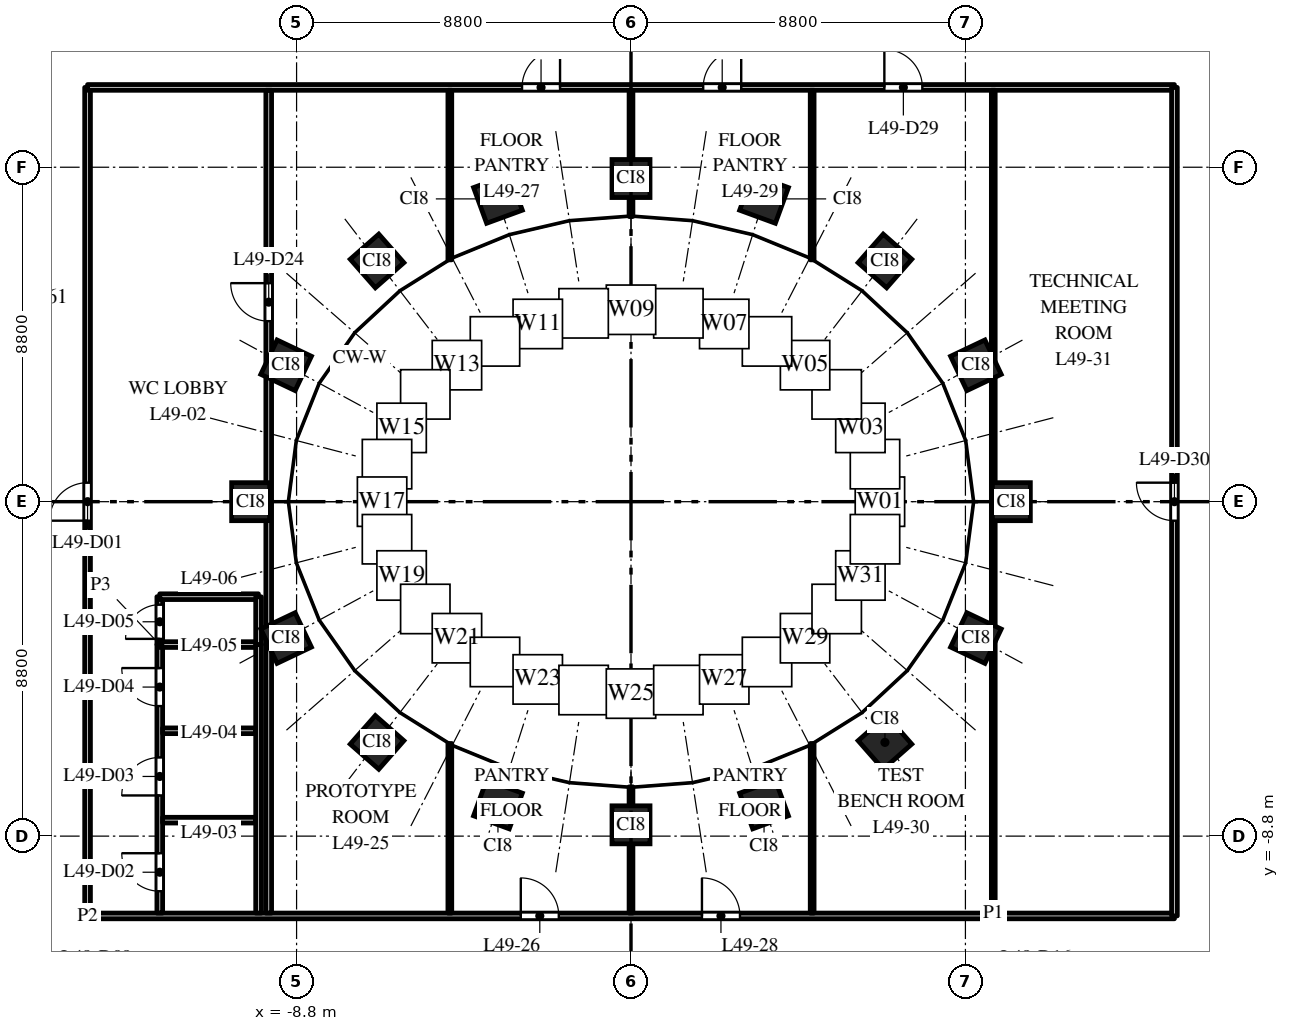
"""IFC4 building model, lengths in metres.
Left out: names, types, materials, properties, quantities, classifications, styles, units other than length and angle.
Written with IfcOpenShell. Run it as: python <this file> out.ifc"""

import sys

from ifc_helpers import new_model, si_unit, direction, frame, frame_2d, origin, origin_2d, place, context, subcontext, project, spatial, rectangle, extrude, element, fill, save


model = new_model("IFC4")
c1 = context("Model", 3, precision=1e-05, world=origin(), true_north=direction((0.0, 1.0)))
c2 = subcontext(c1, "Body", "Model", "MODEL_VIEW")
j1 = project(units=[si_unit("LENGTHUNIT", "METRE"), si_unit("PLANEANGLEUNIT", "RADIAN")], contexts=[c1])
p1 = place(None, origin())
s1 = spatial("IfcSite", under=j1, at=p1, CompositionType="ELEMENT")
p2 = place(p1, origin())
s2 = spatial("IfcBuilding", under=s1, at=p2, CompositionType="ELEMENT")
p3 = place(p2, frame((0.0, 0.0, 237.5)))
s3 = spatial("IfcBuildingStorey", under=s2, at=p3, CompositionType="ELEMENT", Elevation=237.5)
for number, where, z_axis, x_axis in (
    (1, (10.008, 0.0, 0.0), (0.0, 0.0, 1.0), (0.0, 1.0, 0.0)),
    (2, (9.076, 3.588, 0.0), (0.0, 0.0, 1.0), (-0.429, 0.903, 0.0)),
    (3, (6.682, 6.334, 0.0), (0.0, 0.0, 1.0), (-0.751, 0.66, 0.0)),
    (4, (3.501, 7.967, 0.0), (0.0, 0.0, 1.0), (-0.939, 0.344, 0.0)),
    (5, (0.0, 8.503, 0.0), (0.0, 0.0, 1.0), (-1.0, 0.0, 0.0)),
    (6, (-3.501, 7.967, 0.0), (0.0, 0.0, 1.0), (-0.939, -0.344, 0.0)),
    (7, (-6.682, 6.334, 0.0), (0.0, 0.0, 1.0), (-0.751, -0.66, 0.0)),
    (8, (-9.076, 3.588, 0.0), (0.0, 0.0, 1.0), (-0.429, -0.903, 0.0)),
    (9, (-10.008, 0.0, 0.0), (0.0, 0.0, 1.0), (0.0, -1.0, 0.0)),
    (10, (-9.076, -3.588, 0.0), (0.0, 0.0, 1.0), (0.429, -0.903, 0.0)),
    (11, (-6.682, -6.334, 0.0), (0.0, 0.0, 1.0), (0.751, -0.66, 0.0)),
    (12, (-3.501, -7.967, 0.0), (0.0, 0.0, 1.0), (0.939, -0.344, 0.0)),
    (13, (0.0, -8.503, 0.0), (0.0, 0.0, 1.0), (1.0, 0.0, 0.0)),
    (14, (3.501, -7.967, 0.0), (0.0, 0.0, 1.0), (0.939, 0.344, 0.0)),
    (15, (6.682, -6.334, 0.0), (0.0, 0.0, 1.0), (0.751, 0.66, 0.0)),
    (16, (9.076, -3.588, 0.0), (0.0, 0.0, 1.0), (0.429, 0.903, 0.0)),
):
    element("IfcColumn", number, at=place(p3, frame(where, z_axis=z_axis, x_axis=x_axis)), inside=s3, PredefinedType="COLUMN", context=c2, shape_type="SweptSolid", body=[
        extrude(rectangle(XDim=1.0, YDim=1.0, at=origin_2d()), origin(), (0.0, 0.0, 1.0), 4.0),
    ])
p4 = place(p3, frame((-14.3, -10.9, 0.0), z_axis=(0.0, 0.0, 1.0), x_axis=(0.0, 1.0, 0.0)))
e17 = element("IfcWall", 17, at=p4, inside=s3, PredefinedType="PARTITIONING", context=c2, shape_type="SweptSolid", body=[
    extrude(rectangle(XDim=21.8, YDim=0.15, at=frame_2d((10.9, 0.0))), origin(), (0.0, 0.0, 1.0), 2.75),
])
p5 = place(p4, frame((10.4, 0.0, 0.0)))
e18 = element("IfcOpeningElement", 18, at=p5, cuts=e17, PredefinedType="OPENING", context=c2, shape_type="SweptSolid", body=[
    extrude(rectangle(XDim=1.0, YDim=2.1, at=frame_2d((0.5, 1.05))), frame((0.0, 0.085, 0.0), z_axis=(0.0, -1.0, 0.0), x_axis=(1.0, 0.0, 0.0)), (0.0, 0.0, 1.0), 0.17),
])
p6 = place(p3, frame((-14.3, -10.9, 0.0), z_axis=(0.0, 0.0, 1.0), x_axis=(1.0, 0.0, 0.0)))
e19 = element("IfcWall", 19, at=p6, inside=s3, PredefinedType="PARTITIONING", context=c2, shape_type="SweptSolid", body=[
    extrude(rectangle(XDim=28.6, YDim=0.15, at=frame_2d((14.3, 0.0))), origin(), (0.0, 0.0, 1.0), 2.85),
])
p7 = place(p6, frame((11.4, 0.0, 0.0)))
e20 = element("IfcOpeningElement", 20, at=p7, cuts=e19, PredefinedType="OPENING", context=c2, shape_type="SweptSolid", body=[
    extrude(rectangle(XDim=1.0, YDim=2.1, at=frame_2d((0.5, 1.05))), frame((0.0, 0.085, 0.0), z_axis=(0.0, -1.0, 0.0), x_axis=(1.0, 0.0, 0.0)), (0.0, 0.0, 1.0), 0.17),
])
p8 = place(p6, frame((16.167, 0.0, 0.0)))
e21 = element("IfcOpeningElement", 21, at=p8, cuts=e19, PredefinedType="OPENING", context=c2, shape_type="SweptSolid", body=[
    extrude(rectangle(XDim=1.0, YDim=2.1, at=frame_2d((0.5, 1.05))), frame((0.0, 0.085, 0.0), z_axis=(0.0, -1.0, 0.0), x_axis=(1.0, 0.0, 0.0)), (0.0, 0.0, 1.0), 0.17),
])
p9 = place(p3, frame((-14.3, 10.9, 0.0), z_axis=(0.0, 0.0, 1.0), x_axis=(1.0, 0.0, 0.0)))
e22 = element("IfcWall", 22, at=p9, inside=s3, PredefinedType="PARTITIONING", context=c2, shape_type="SweptSolid", body=[
    extrude(rectangle(XDim=28.6, YDim=0.15, at=frame_2d((14.3, 0.0))), origin(), (0.0, 0.0, 1.0), 2.85),
])
p10 = place(p9, frame((11.433, 0.0, 0.0)))
e23 = element("IfcOpeningElement", 23, at=p10, cuts=e22, PredefinedType="OPENING", context=c2, shape_type="SweptSolid", body=[
    extrude(rectangle(XDim=1.0, YDim=2.1, at=frame_2d((0.5, 1.05))), frame((0.0, 0.085, 0.0), z_axis=(0.0, -1.0, 0.0), x_axis=(1.0, 0.0, 0.0)), (0.0, 0.0, 1.0), 0.17),
])
p11 = place(p9, frame((16.2, 0.0, 0.0)))
e24 = element("IfcOpeningElement", 24, at=p11, cuts=e22, PredefinedType="OPENING", context=c2, shape_type="SweptSolid", body=[
    extrude(rectangle(XDim=1.0, YDim=2.1, at=frame_2d((0.5, 1.05))), frame((0.0, 0.085, 0.0), z_axis=(0.0, -1.0, 0.0), x_axis=(1.0, 0.0, 0.0)), (0.0, 0.0, 1.0), 0.17),
])
p12 = place(p9, frame((20.967, 0.0, 0.0)))
e25 = element("IfcOpeningElement", 25, at=p12, cuts=e22, PredefinedType="OPENING", context=c2, shape_type="SweptSolid", body=[
    extrude(rectangle(XDim=1.0, YDim=2.1, at=frame_2d((0.5, 1.05))), frame((0.0, 0.085, 0.0), z_axis=(0.0, -1.0, 0.0), x_axis=(1.0, 0.0, 0.0)), (0.0, 0.0, 1.0), 0.17),
])
p13 = place(p3, frame((-12.4, -10.825, 0.0), z_axis=(0.0, 0.0, 1.0), x_axis=(0.0, 1.0, 0.0)))
e26 = element("IfcWall", 26, at=p13, inside=s3, PredefinedType="PARTITIONING", context=c2, shape_type="SweptSolid", body=[
    extrude(rectangle(XDim=7.065, YDim=0.15, at=frame_2d((3.532, 0.0))), origin(), (0.0, 0.0, 1.0), 2.75),
])
p14 = place(p13, frame((0.575, 0.0, 0.0)))
e27 = element("IfcOpeningElement", 27, at=p14, cuts=e26, PredefinedType="OPENING", context=c2, shape_type="SweptSolid", body=[
    extrude(rectangle(XDim=1.0, YDim=2.1, at=frame_2d((0.5, 1.05))), frame((0.0, 0.085, 0.0), z_axis=(0.0, -1.0, 0.0), x_axis=(1.0, 0.0, 0.0)), (0.0, 0.0, 1.0), 0.17),
])
p15 = place(p13, frame((3.095, 0.0, 0.0)))
e28 = element("IfcOpeningElement", 28, at=p15, cuts=e26, PredefinedType="OPENING", context=c2, shape_type="SweptSolid", body=[
    extrude(rectangle(XDim=1.0, YDim=2.1, at=frame_2d((0.5, 1.05))), frame((0.0, 0.085, 0.0), z_axis=(0.0, -1.0, 0.0), x_axis=(1.0, 0.0, 0.0)), (0.0, 0.0, 1.0), 0.17),
])
p16 = place(p13, frame((5.447, 0.0, 0.0)))
e29 = element("IfcOpeningElement", 29, at=p16, cuts=e26, PredefinedType="OPENING", context=c2, shape_type="SweptSolid", body=[
    extrude(rectangle(XDim=1.0, YDim=2.1, at=frame_2d((0.5, 1.05))), frame((0.0, 0.085, 0.0), z_axis=(0.0, -1.0, 0.0), x_axis=(1.0, 0.0, 0.0)), (0.0, 0.0, 1.0), 0.17),
])
p17 = place(p3, frame((-12.325, -8.38, 0.0), z_axis=(0.0, 0.0, 1.0), x_axis=(1.0, 0.0, 0.0)))
e30 = element("IfcWall", 30, at=p17, inside=s3, PredefinedType="PARTITIONING", context=c2, shape_type="SweptSolid", body=[
    extrude(rectangle(XDim=2.45, YDim=0.15, at=frame_2d((1.225, 0.0))), origin(), (0.0, 0.0, 1.0), 2.75),
])
p18 = place(p3, frame((-12.325, -6.028, 0.0), z_axis=(0.0, 0.0, 1.0), x_axis=(1.0, 0.0, 0.0)))
e31 = element("IfcWall", 31, at=p18, inside=s3, PredefinedType="PARTITIONING", context=c2, shape_type="SweptSolid", body=[
    extrude(rectangle(XDim=2.45, YDim=0.15, at=frame_2d((1.225, 0.0))), origin(), (0.0, 0.0, 1.0), 3.7),
])
p19 = place(p3, frame((-12.4, -3.76, 0.0), z_axis=(0.0, 0.0, 1.0), x_axis=(0.0, 1.0, 0.0)))
e32 = element("IfcWall", 32, at=p19, inside=s3, PredefinedType="PARTITIONING", context=c2, shape_type="SweptSolid", body=[
    extrude(rectangle(XDim=1.26, YDim=0.15, at=frame_2d((0.63, 0.0))), origin(), (0.0, 0.0, 1.0), 3.7),
])
p20 = place(p19, frame((0.15, 0.0, 0.0)))
e33 = element("IfcOpeningElement", 33, at=p20, cuts=e32, PredefinedType="OPENING", context=c2, shape_type="SweptSolid", body=[
    extrude(rectangle(XDim=0.9, YDim=2.1, at=frame_2d((0.45, 1.05))), frame((0.0, 0.085, 0.0), z_axis=(0.0, -1.0, 0.0), x_axis=(1.0, 0.0, 0.0)), (0.0, 0.0, 1.0), 0.17),
])
p21 = place(p3, frame((-12.4, -3.76, 0.0), z_axis=(0.0, 0.0, 1.0), x_axis=(1.0, 0.0, 0.0)))
e34 = element("IfcWall", 34, at=p21, inside=s3, PredefinedType="PARTITIONING", context=c2, shape_type="SweptSolid", body=[
    extrude(rectangle(XDim=2.6, YDim=0.15, at=frame_2d((1.3, 0.0))), origin(), (0.0, 0.0, 1.0), 3.7),
])
p22 = place(p3, frame((-12.4, -2.5, 0.0), z_axis=(0.0, 0.0, 1.0), x_axis=(1.0, 0.0, 0.0)))
e35 = element("IfcWall", 35, at=p22, inside=s3, PredefinedType="PARTITIONING", context=c2, shape_type="SweptSolid", body=[
    extrude(rectangle(XDim=2.596, YDim=0.15, at=frame_2d((1.298, 0.0))), origin(), (0.0, 0.0, 1.0), 3.7),
])
p23 = place(p3, frame((-9.8, -10.825, 0.0), z_axis=(0.0, 0.0, 1.0), x_axis=(0.0, 1.0, 0.0)))
e36 = element("IfcWall", 36, at=p23, inside=s3, PredefinedType="PARTITIONING", context=c2, shape_type="SweptSolid", body=[
    extrude(rectangle(XDim=7.065, YDim=0.15, at=frame_2d((3.532, 0.0))), origin(), (0.0, 0.0, 1.0), 2.75),
])
p24 = place(p3, frame((-9.8, -3.76, 0.0), z_axis=(0.0, 0.0, 1.0), x_axis=(0.0, 1.0, 0.0)))
e37 = element("IfcWall", 37, at=p24, inside=s3, PredefinedType="PARTITIONING", context=c2, shape_type="SweptSolid", body=[
    extrude(rectangle(XDim=1.256, YDim=0.15, at=frame_2d((0.628, 0.0))), origin(), (0.0, 0.0, 1.0), 3.7),
])
p25 = place(p3, frame((-9.533, -10.825, 0.0), z_axis=(0.0, 0.0, 1.0), x_axis=(0.0, 1.0, 0.0)))
e38 = element("IfcWall", 38, at=p25, inside=s3, PredefinedType="PARTITIONING", context=c2, shape_type="SweptSolid", body=[
    extrude(rectangle(XDim=21.65, YDim=0.15, at=frame_2d((10.825, 0.0))), origin(), (0.0, 0.0, 1.0), 2.75),
])
p26 = place(p25, frame((15.575, 0.0, 0.0)))
e39 = element("IfcOpeningElement", 39, at=p26, cuts=e38, PredefinedType="OPENING", context=c2, shape_type="SweptSolid", body=[
    extrude(rectangle(XDim=1.0, YDim=2.1, at=frame_2d((0.5, 1.05))), frame((0.0, 0.085, 0.0), z_axis=(0.0, -1.0, 0.0), x_axis=(1.0, 0.0, 0.0)), (0.0, 0.0, 1.0), 0.17),
])
for number, where, z_axis, x_axis in (
    (40, (-4.767, -10.825, 0.0), (0.0, 0.0, 1.0), (0.0, 1.0, 0.0)),
    (41, (-4.767, 6.363, 0.0), (0.0, 0.0, 1.0), (0.0, 1.0, 0.0)),
):
    element("IfcWall", number, at=place(p3, frame(where, z_axis=z_axis, x_axis=x_axis)), inside=s3, PredefinedType="PARTITIONING", context=c2, shape_type="SweptSolid", body=[
        extrude(rectangle(XDim=4.462, YDim=0.1, at=frame_2d((2.231, 0.0))), origin(), (0.0, 0.0, 1.0), 3.0),
    ])
for number, where, z_axis, x_axis in (
    (42, (0.0, -10.825, 0.0), (0.0, 0.0, 1.0), (0.0, 1.0, 0.0)),
    (43, (0.0, 7.504, 0.0), (0.0, 0.0, 1.0), (0.0, 1.0, 0.0)),
):
    element("IfcWall", number, at=place(p3, frame(where, z_axis=z_axis, x_axis=x_axis)), inside=s3, PredefinedType="PARTITIONING", context=c2, shape_type="SweptSolid", body=[
        extrude(rectangle(XDim=3.321, YDim=0.1, at=frame_2d((1.661, 0.0))), origin(), (0.0, 0.0, 1.0), 3.7),
    ])
for number, where, z_axis, x_axis in (
    (44, (4.767, -10.825, 0.0), (0.0, 0.0, 1.0), (0.0, 1.0, 0.0)),
    (45, (4.767, 6.363, 0.0), (0.0, 0.0, 1.0), (0.0, 1.0, 0.0)),
):
    element("IfcWall", number, at=place(p3, frame(where, z_axis=z_axis, x_axis=x_axis)), inside=s3, PredefinedType="PARTITIONING", context=c2, shape_type="SweptSolid", body=[
        extrude(rectangle(XDim=4.462, YDim=0.1, at=frame_2d((2.231, 0.0))), origin(), (0.0, 0.0, 1.0), 2.85),
    ])
p27 = place(p3, frame((9.533, -10.825, 0.0), z_axis=(0.0, 0.0, 1.0), x_axis=(0.0, 1.0, 0.0)))
e46 = element("IfcWall", 46, at=p27, inside=s3, PredefinedType="PARTITIONING", context=c2, shape_type="SweptSolid", body=[
    extrude(rectangle(XDim=21.65, YDim=0.1, at=frame_2d((10.825, 0.0))), origin(), (0.0, 0.0, 1.0), 2.75),
])
p28 = place(p3, frame((14.3, -10.9, 0.0), z_axis=(0.0, 0.0, 1.0), x_axis=(0.0, 1.0, 0.0)))
e47 = element("IfcWall", 47, at=p28, inside=s3, PredefinedType="PARTITIONING", context=c2, shape_type="SweptSolid", body=[
    extrude(rectangle(XDim=21.8, YDim=0.15, at=frame_2d((10.9, 0.0))), origin(), (0.0, 0.0, 1.0), 2.75),
])
p29 = place(p28, frame((10.4, 0.0, 0.0)))
e48 = element("IfcOpeningElement", 48, at=p29, cuts=e47, PredefinedType="OPENING", context=c2, shape_type="SweptSolid", body=[
    extrude(rectangle(XDim=1.0, YDim=2.1, at=frame_2d((0.5, 1.05))), frame((0.0, 0.085, 0.0), z_axis=(0.0, -1.0, 0.0), x_axis=(1.0, 0.0, 0.0)), (0.0, 0.0, 1.0), 0.17),
])
p30 = place(p5, origin())
e49 = element("IfcDoor", 49, at=p30, inside=s3, OperationType="SINGLE_SWING_LEFT", PredefinedType="DOOR", context=c2, shape_type="SweptSolid", body=[
    extrude(rectangle(XDim=1.0, YDim=2.1, at=frame_2d((0.5, 1.05))), frame((0.0, 0.025, 0.0), z_axis=(0.0, -1.0, 0.0), x_axis=(1.0, 0.0, 0.0)), (0.0, 0.0, 1.0), 0.05),
])
fill(e18, e49)
p31 = place(p14, origin())
e50 = element("IfcDoor", 50, at=p31, inside=s3, OperationType="SINGLE_SWING_RIGHT", PredefinedType="DOOR", context=c2, shape_type="SweptSolid", body=[
    extrude(rectangle(XDim=1.0, YDim=2.1, at=frame_2d((0.5, 1.05))), frame((0.0, 0.025, 0.0), z_axis=(0.0, -1.0, 0.0), x_axis=(1.0, 0.0, 0.0)), (0.0, 0.0, 1.0), 0.05),
])
fill(e27, e50)
p32 = place(p15, origin())
e51 = element("IfcDoor", 51, at=p32, inside=s3, OperationType="SINGLE_SWING_LEFT", PredefinedType="DOOR", context=c2, shape_type="SweptSolid", body=[
    extrude(rectangle(XDim=1.0, YDim=2.1, at=frame_2d((0.5, 1.05))), frame((0.0, 0.025, 0.0), z_axis=(0.0, -1.0, 0.0), x_axis=(1.0, 0.0, 0.0)), (0.0, 0.0, 1.0), 0.05),
])
fill(e28, e51)
p33 = place(p16, origin())
e52 = element("IfcDoor", 52, at=p33, inside=s3, OperationType="SINGLE_SWING_RIGHT", PredefinedType="DOOR", context=c2, shape_type="SweptSolid", body=[
    extrude(rectangle(XDim=1.0, YDim=2.1, at=frame_2d((0.5, 1.05))), frame((0.0, 0.025, 0.0), z_axis=(0.0, -1.0, 0.0), x_axis=(1.0, 0.0, 0.0)), (0.0, 0.0, 1.0), 0.05),
])
fill(e29, e52)
p34 = place(p20, origin())
e53 = element("IfcDoor", 53, at=p34, inside=s3, OperationType="SINGLE_SWING_LEFT", PredefinedType="DOOR", context=c2, shape_type="SweptSolid", body=[
    extrude(rectangle(XDim=0.9, YDim=2.1, at=frame_2d((0.45, 1.05))), frame((0.0, 0.025, 0.0), z_axis=(0.0, -1.0, 0.0), x_axis=(1.0, 0.0, 0.0)), (0.0, 0.0, 1.0), 0.05),
])
fill(e33, e53)
p35 = place(p26, origin())
e54 = element("IfcDoor", 54, at=p35, inside=s3, OperationType="SINGLE_SWING_RIGHT", PredefinedType="DOOR", context=c2, shape_type="SweptSolid", body=[
    extrude(rectangle(XDim=1.0, YDim=2.1, at=frame_2d((0.5, 1.05))), frame((0.0, 0.025, 0.0), z_axis=(0.0, -1.0, 0.0), x_axis=(1.0, 0.0, 0.0)), (0.0, 0.0, 1.0), 0.05),
])
fill(e39, e54)
p36 = place(p7, origin())
e55 = element("IfcDoor", 55, at=p36, inside=s3, OperationType="SINGLE_SWING_LEFT", PredefinedType="DOOR", context=c2, shape_type="SweptSolid", body=[
    extrude(rectangle(XDim=1.0, YDim=2.1, at=frame_2d((0.5, 1.05))), frame((0.0, 0.025, 0.0), z_axis=(0.0, -1.0, 0.0), x_axis=(1.0, 0.0, 0.0)), (0.0, 0.0, 1.0), 0.05),
])
fill(e20, e55)
p37 = place(p10, origin())
e56 = element("IfcDoor", 56, at=p37, inside=s3, OperationType="SINGLE_SWING_RIGHT", PredefinedType="DOOR", context=c2, shape_type="SweptSolid", body=[
    extrude(rectangle(XDim=1.0, YDim=2.1, at=frame_2d((0.5, 1.05))), frame((0.0, 0.025, 0.0), z_axis=(0.0, -1.0, 0.0), x_axis=(1.0, 0.0, 0.0)), (0.0, 0.0, 1.0), 0.05),
])
fill(e23, e56)
p38 = place(p8, origin())
e57 = element("IfcDoor", 57, at=p38, inside=s3, OperationType="SINGLE_SWING_LEFT", PredefinedType="DOOR", context=c2, shape_type="SweptSolid", body=[
    extrude(rectangle(XDim=1.0, YDim=2.1, at=frame_2d((0.5, 1.05))), frame((0.0, 0.025, 0.0), z_axis=(0.0, -1.0, 0.0), x_axis=(1.0, 0.0, 0.0)), (0.0, 0.0, 1.0), 0.05),
])
fill(e21, e57)
p39 = place(p11, origin())
e58 = element("IfcDoor", 58, at=p39, inside=s3, OperationType="SINGLE_SWING_RIGHT", PredefinedType="DOOR", context=c2, shape_type="SweptSolid", body=[
    extrude(rectangle(XDim=1.0, YDim=2.1, at=frame_2d((0.5, 1.05))), frame((0.0, 0.025, 0.0), z_axis=(0.0, -1.0, 0.0), x_axis=(1.0, 0.0, 0.0)), (0.0, 0.0, 1.0), 0.05),
])
fill(e24, e58)
p40 = place(p12, origin())
e59 = element("IfcDoor", 59, at=p40, inside=s3, OperationType="SINGLE_SWING_LEFT", PredefinedType="DOOR", context=c2, shape_type="SweptSolid", body=[
    extrude(rectangle(XDim=1.0, YDim=2.1, at=frame_2d((0.5, 1.05))), frame((0.0, 0.025, 0.0), z_axis=(0.0, -1.0, 0.0), x_axis=(1.0, 0.0, 0.0)), (0.0, 0.0, 1.0), 0.05),
])
fill(e25, e59)
p41 = place(p29, origin())
e60 = element("IfcDoor", 60, at=p41, inside=s3, OperationType="SINGLE_SWING_RIGHT", PredefinedType="DOOR", context=c2, shape_type="SweptSolid", body=[
    extrude(rectangle(XDim=1.0, YDim=2.1, at=frame_2d((0.5, 1.05))), frame((0.0, 0.025, 0.0), z_axis=(0.0, -1.0, 0.0), x_axis=(1.0, 0.0, 0.0)), (0.0, 0.0, 1.0), 0.05),
])
fill(e48, e60)
save(model, sys.argv[1])
